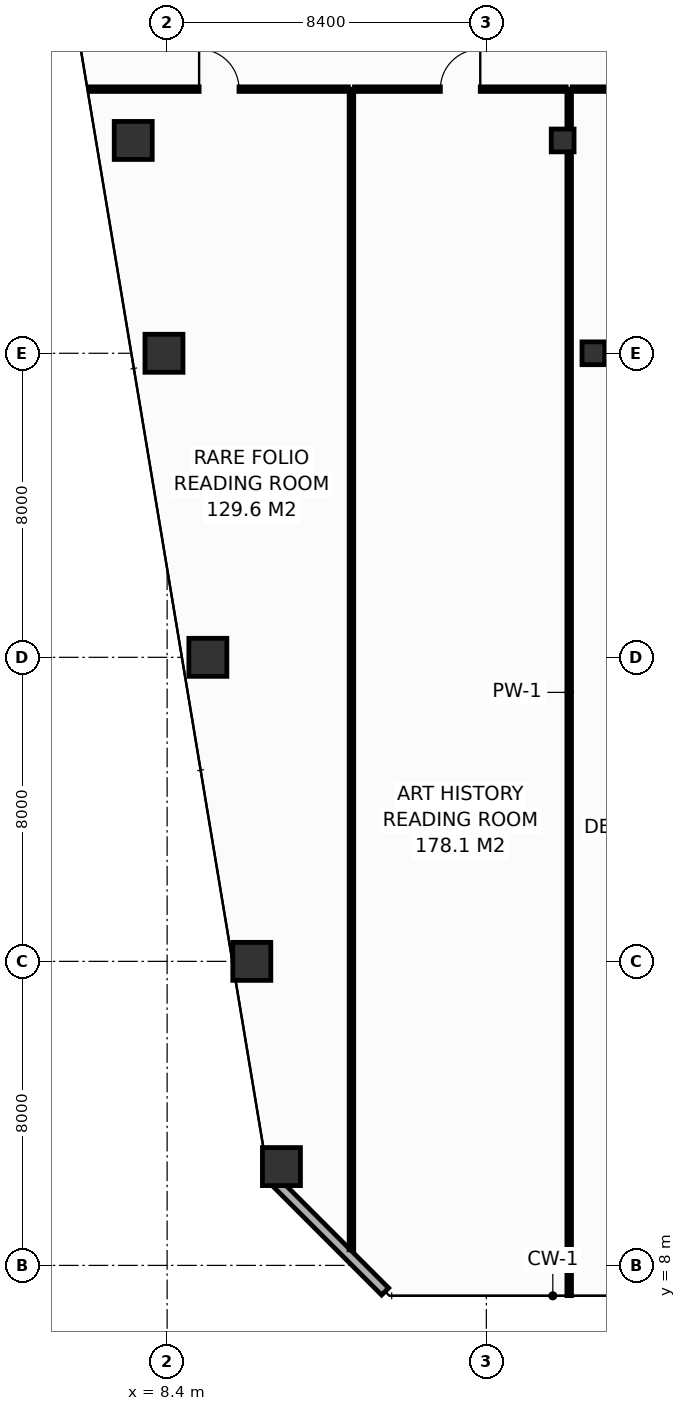
"""IFC4 building model, lengths in metres.
Left out: names, types, materials, properties, quantities, classifications, styles, units other than length and angle.
Written with IfcOpenShell. Run it as: python <this file> out.ifc"""

import sys

from ifc_helpers import new_model, si_unit, direction, frame, frame_2d, origin, origin_2d, place, context, subcontext, project, spatial, rectangle, hollow_rectangle, extrude, element, fill, save


model = new_model("IFC4")
c1 = context("Model", 3, precision=1e-05, world=origin(), true_north=direction((0.0, 1.0)))
c2 = subcontext(c1, "Body", "Model", "MODEL_VIEW")
j1 = project(units=[si_unit("LENGTHUNIT", "METRE"), si_unit("PLANEANGLEUNIT", "RADIAN")], contexts=[c1])
p1 = place(None, origin())
s1 = spatial("IfcSite", under=j1, at=p1, CompositionType="ELEMENT")
p2 = place(p1, origin())
s2 = spatial("IfcBuilding", under=s1, at=p2, CompositionType="ELEMENT")
p3 = place(p2, frame((0.0, 0.0, 137.2)))
s3 = spatial("IfcBuildingStorey", under=s2, at=p3, CompositionType="ELEMENT", Elevation=137.2)
for number, where, z_axis, x_axis in (
    (1, (11.408, 10.6, 0.0), (0.0, 0.0, 1.0), (1.0, 0.0, 0.0)),
    (2, (10.628, 16.0, 0.0), (0.0, 0.0, 1.0), (1.0, 0.0, 0.0)),
    (3, (9.472, 24.0, 0.0), (0.0, 0.0, 1.0), (1.0, 0.0, 0.0)),
    (4, (8.317, 32.0, 0.0), (0.0, 0.0, 1.0), (1.0, 0.0, 0.0)),
):
    element("IfcColumn", number, at=place(p3, frame(where, z_axis=z_axis, x_axis=x_axis)), inside=s3, PredefinedType="COLUMN", context=c2, shape_type="SweptSolid", body=[
        extrude(hollow_rectangle(XDim=1.0, YDim=1.0, WallThickness=0.045, at=origin_2d()), origin(), (0.0, 0.0, 1.0), 3.8),
    ])
p4 = place(p3, frame((19.617, 32.0, 0.0), z_axis=(0.0, 0.0, 1.0), x_axis=(1.0, 0.0, 0.0)))
e5 = element("IfcColumn", 5, at=p4, inside=s3, PredefinedType="COLUMN", context=c2, shape_type="SweptSolid", body=[
    extrude(hollow_rectangle(XDim=0.6, YDim=0.6, WallThickness=0.028, at=origin_2d()), origin(), (0.0, 0.0, 1.0), 3.8),
])
p5 = place(p3, frame((7.508, 37.6, 0.0), z_axis=(0.0, 0.0, 1.0), x_axis=(1.0, 0.0, 0.0)))
e6 = element("IfcColumn", 6, at=p5, inside=s3, PredefinedType="COLUMN", context=c2, shape_type="SweptSolid", body=[
    extrude(hollow_rectangle(XDim=1.0, YDim=1.0, WallThickness=0.045, at=origin_2d()), origin(), (0.0, 0.0, 1.0), 3.8),
])
p6 = place(p3, frame((18.808, 37.6, 0.0), z_axis=(0.0, 0.0, 1.0), x_axis=(1.0, 0.0, 0.0)))
e7 = element("IfcColumn", 7, at=p6, inside=s3, PredefinedType="COLUMN", context=c2, shape_type="SweptSolid", body=[
    extrude(hollow_rectangle(XDim=0.6, YDim=0.6, WallThickness=0.028, at=origin_2d()), origin(), (0.0, 0.0, 1.0), 3.8),
])
p7 = place(p3, frame((11.162, 10.287, 0.0), z_axis=(0.0, 0.0, 1.0), x_axis=(0.70707775441, -0.707135806771, 0.0)))
e8 = element("IfcWall", 8, at=p7, inside=s3, PredefinedType="STANDARD", context=c2, shape_type="SweptSolid", body=[
    extrude(rectangle(XDim=4.206, YDim=0.26, at=frame_2d((2.103, 0.0))), origin(), (0.0, 0.0, 1.0), 3.55),
])
p8 = place(p3, frame((13.25, 8.411, 0.0), z_axis=(0.0, 0.0, 1.0), x_axis=(0.0, 1.0, 0.0)))
e9 = element("IfcWall", 9, at=p8, inside=s3, PredefinedType="PARTITIONING", context=c2, shape_type="SweptSolid", body=[
    extrude(rectangle(XDim=30.539, YDim=0.12, at=frame_2d((15.27, 0.0))), origin(), (0.0, 0.0, 1.0), 2.835),
])
p9 = place(p3, frame((18.98, 7.205, 0.0), z_axis=(0.0, 0.0, 1.0), x_axis=(0.0, 1.0, 0.0)))
e10 = element("IfcWall", 10, at=p9, inside=s3, PredefinedType="PARTITIONING", context=c2, shape_type="SweptSolid", body=[
    extrude(rectangle(XDim=31.745, YDim=0.12, at=frame_2d((15.873, 0.0))), origin(), (0.0, 0.0, 1.0), 2.835),
])
p10 = place(p3, frame((6.363, 38.95, 0.0), z_axis=(0.0, 0.0, 1.0), x_axis=(1.0, 0.0, 0.0)))
e11 = element("IfcWall", 11, at=p10, inside=s3, PredefinedType="PARTITIONING", context=c2, shape_type="SweptSolid", body=[
    extrude(rectangle(XDim=6.807, YDim=0.12, at=frame_2d((3.404, 0.0))), origin(), (0.0, 0.0, 1.0), 3.035),
])
p11 = place(p10, frame((2.879, 0.0, 0.0)))
e12 = element("IfcOpeningElement", 12, at=p11, cuts=e11, PredefinedType="OPENING", context=c2, shape_type="SweptSolid", body=[
    extrude(rectangle(XDim=1.05, YDim=2.15, at=frame_2d((0.525, 1.075))), frame((0.0, 0.07, 0.0), z_axis=(0.0, -1.0, 0.0), x_axis=(1.0, 0.0, 0.0)), (0.0, 0.0, 1.0), 0.14),
])
p12 = place(p3, frame((13.33, 38.95, 0.0), z_axis=(0.0, 0.0, 1.0), x_axis=(1.0, 0.0, 0.0)))
e13 = element("IfcWall", 13, at=p12, inside=s3, PredefinedType="PARTITIONING", context=c2, shape_type="SweptSolid", body=[
    extrude(rectangle(XDim=5.57, YDim=0.12, at=frame_2d((2.785, 0.0))), origin(), (0.0, 0.0, 1.0), 3.55),
])
p13 = place(p12, frame((2.26, 0.0, 0.0)))
e14 = element("IfcOpeningElement", 14, at=p13, cuts=e13, PredefinedType="OPENING", context=c2, shape_type="SweptSolid", body=[
    extrude(rectangle(XDim=1.05, YDim=2.15, at=frame_2d((0.525, 1.075))), frame((0.0, 0.07, 0.0), z_axis=(0.0, -1.0, 0.0), x_axis=(1.0, 0.0, 0.0)), (0.0, 0.0, 1.0), 0.14),
])
p14 = place(p3, frame((19.06, 38.95, 0.0), z_axis=(0.0, 0.0, 1.0), x_axis=(1.0, 0.0, 0.0)))
e15 = element("IfcWall", 15, at=p14, inside=s3, PredefinedType="PARTITIONING", context=c2, shape_type="SweptSolid", body=[
    extrude(rectangle(XDim=4.79, YDim=0.12, at=frame_2d((2.395, 0.0))), origin(), (0.0, 0.0, 1.0), 2.835),
])
p15 = place(p14, frame((1.945, 0.0, 0.0)))
e16 = element("IfcOpeningElement", 16, at=p15, cuts=e15, PredefinedType="OPENING", context=c2, shape_type="SweptSolid", body=[
    extrude(rectangle(XDim=0.9, YDim=2.1, at=frame_2d((0.45, 1.05))), frame((0.0, 0.07, 0.0), z_axis=(0.0, -1.0, 0.0), x_axis=(1.0, 0.0, 0.0)), (0.0, 0.0, 1.0), 0.14),
])
p16 = place(p11, origin())
e17 = element("IfcDoor", 17, at=p16, inside=s3, OperationType="SINGLE_SWING_LEFT", PredefinedType="DOOR", context=c2, shape_type="SweptSolid", body=[
    extrude(rectangle(XDim=1.05, YDim=2.15, at=frame_2d((0.525, 1.075))), frame((0.0, 0.025, 0.0), z_axis=(0.0, -1.0, 0.0), x_axis=(1.0, 0.0, 0.0)), (0.0, 0.0, 1.0), 0.05),
])
fill(e12, e17)
p17 = place(p13, origin())
e18 = element("IfcDoor", 18, at=p17, inside=s3, OperationType="SINGLE_SWING_RIGHT", PredefinedType="DOOR", context=c2, shape_type="SweptSolid", body=[
    extrude(rectangle(XDim=1.05, YDim=2.15, at=frame_2d((0.525, 1.075))), frame((0.0, 0.025, 0.0), z_axis=(0.0, -1.0, 0.0), x_axis=(1.0, 0.0, 0.0)), (0.0, 0.0, 1.0), 0.05),
])
fill(e14, e18)
save(model, sys.argv[1])
